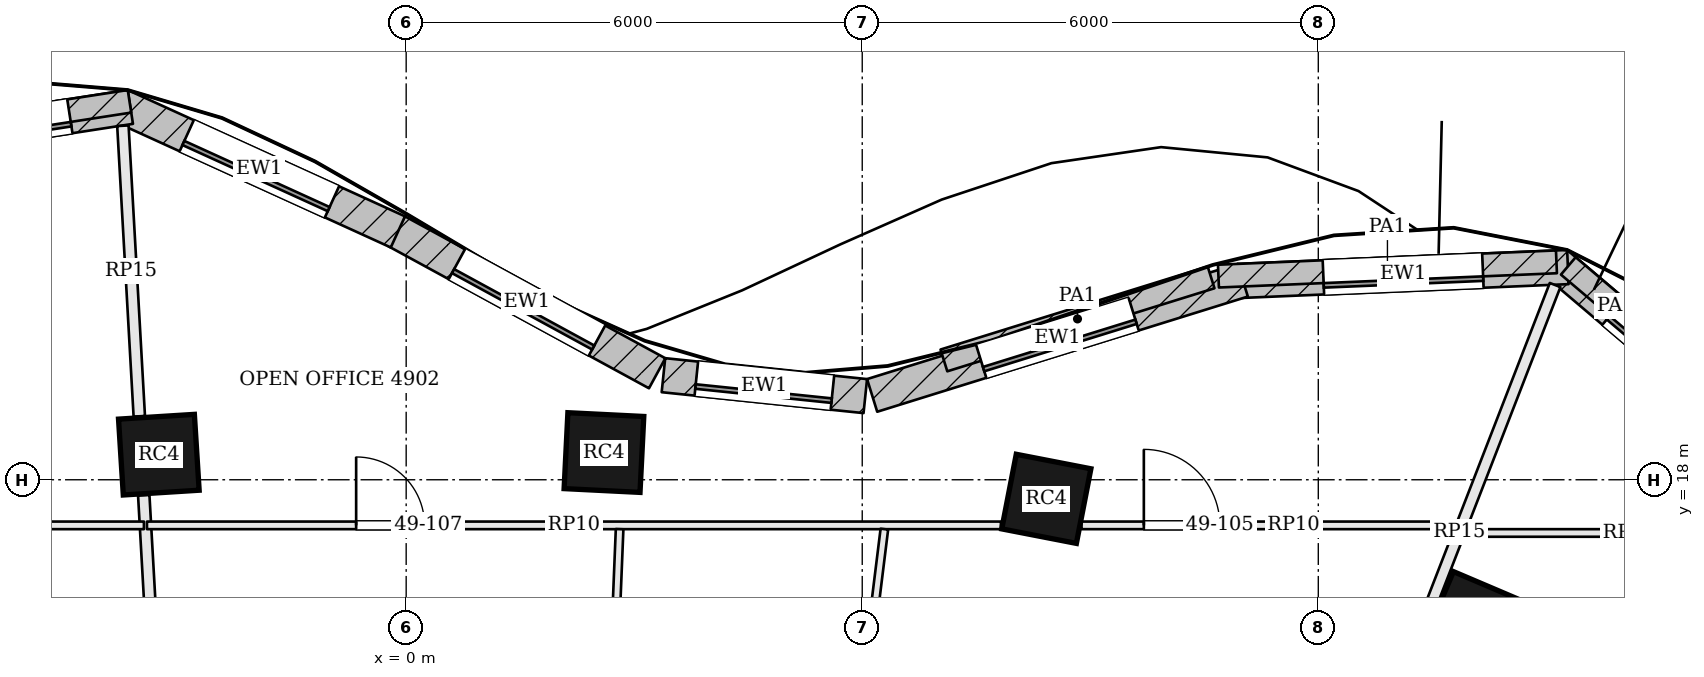
"""IFC4 building model, lengths in metres.
Left out: names, types, materials, properties, quantities, classifications, styles, units other than length and angle.
Written with IfcOpenShell. Run it as: python <this file> out.ifc"""

import sys

from ifc_helpers import new_model, si_unit, direction, frame, frame_2d, origin, origin_2d, place, context, subcontext, project, spatial, rectangle, extrude, element, fill, save


model = new_model("IFC4")
c1 = context("Model", 3, precision=1e-05, world=origin(), true_north=direction((0.0, 1.0)))
c2 = subcontext(c1, "Body", "Model", "MODEL_VIEW")
j1 = project(units=[si_unit("LENGTHUNIT", "METRE"), si_unit("PLANEANGLEUNIT", "RADIAN")], contexts=[c1])
p1 = place(None, origin())
s1 = spatial("IfcSite", under=j1, at=p1, CompositionType="ELEMENT")
p2 = place(p1, origin())
s2 = spatial("IfcBuilding", under=s1, at=p2, CompositionType="ELEMENT")
p3 = place(p2, frame((0.0, 0.0, 201.3)))
s3 = spatial("IfcBuildingStorey", under=s2, at=p3, CompositionType="ELEMENT", Elevation=201.3)
for number, where, z_axis, x_axis in (
    (1, (14.042, 16.136, 0.0), (0.0, 0.0, 1.0), (-0.92, 0.392, 0.0)),
    (2, (8.422, 17.749, 0.0), (0.0, 0.0, 1.0), (-0.982, 0.191, 0.0)),
    (3, (2.602, 18.358, 0.0), (0.0, 0.0, 1.0), (-0.999, 0.05, 0.0)),
    (4, (-3.254, 18.33, 0.0), (0.0, 0.0, 1.0), (-0.998, -0.063, 0.0)),
):
    element("IfcColumn", number, at=place(p3, frame(where, z_axis=z_axis, x_axis=x_axis)), inside=s3, PredefinedType="COLUMN", context=c2, shape_type="SweptSolid", body=[
        extrude(rectangle(XDim=1.0, YDim=1.0, at=origin_2d()), origin(), (0.0, 0.0, 1.0), 3.9),
    ])
p4 = place(p3, frame((18.238, 18.212, 0.0), z_axis=(0.0, 0.0, 1.0), x_axis=(-0.762479604733, 0.647012250554, 0.0)))
e5 = element("IfcWall", 5, at=p4, inside=s3, PredefinedType="SOLIDWALL", context=c2, shape_type="SweptSolid", body=[
    extrude(rectangle(XDim=4.079, YDim=0.45, at=frame_2d((2.039, 0.0))), origin(), (0.0, 0.0, 1.0), 3.7),
])
p5 = place(p4, frame((0.99, 0.0, 0.9)))
e6 = element("IfcOpeningElement", 6, at=p5, cuts=e5, PredefinedType="OPENING", context=c2, shape_type="SweptSolid", body=[
    extrude(rectangle(XDim=2.1, YDim=2.3, at=frame_2d((1.05, 1.15))), frame((0.0, 0.235, 0.0), z_axis=(0.0, -1.0, 0.0), x_axis=(1.0, 0.0, 0.0)), (0.0, 0.0, 1.0), 0.47),
])
p6 = place(p3, frame((15.283, 20.798, 0.0), z_axis=(0.0, 0.0, 1.0), x_axis=(-0.999108814386, -0.042208731526, 0.0)))
e7 = element("IfcWall", 7, at=p6, inside=s3, PredefinedType="SOLIDWALL", context=c2, shape_type="SweptSolid", body=[
    extrude(rectangle(XDim=4.338, YDim=0.45, at=frame_2d((2.169, 0.0))), origin(), (0.0, 0.0, 1.0), 3.7),
])
p7 = place(p6, frame((1.119, 0.0, 0.9)))
e8 = element("IfcOpeningElement", 8, at=p7, cuts=e7, PredefinedType="OPENING", context=c2, shape_type="SweptSolid", body=[
    extrude(rectangle(XDim=2.1, YDim=2.3, at=frame_2d((1.05, 1.15))), frame((0.0, 0.235, 0.0), z_axis=(0.0, -1.0, 0.0), x_axis=(1.0, 0.0, 0.0)), (0.0, 0.0, 1.0), 0.47),
])
p8 = place(p3, frame((11.007, 20.625, 0.0), z_axis=(0.0, 0.0, 1.0), x_axis=(-0.954949254112, -0.296769139352, 0.0)))
e9 = element("IfcWall", 9, at=p8, inside=s3, PredefinedType="SOLIDWALL", context=c2, shape_type="SweptSolid", body=[
    extrude(rectangle(XDim=5.106, YDim=0.45, at=frame_2d((2.553, 0.0))), origin(), (0.0, 0.0, 1.0), 3.7),
])
p9 = place(p8, frame((1.503, 0.0, 0.9)))
e10 = element("IfcOpeningElement", 10, at=p9, cuts=e9, PredefinedType="OPENING", context=c2, shape_type="SweptSolid", body=[
    extrude(rectangle(XDim=2.1, YDim=2.3, at=frame_2d((1.05, 1.15))), frame((0.0, 0.235, 0.0), z_axis=(0.0, -1.0, 0.0), x_axis=(1.0, 0.0, 0.0)), (0.0, 0.0, 1.0), 0.47),
])
p10 = place(p3, frame((6.04, 19.101, 0.0), z_axis=(0.0, 0.0, 1.0), x_axis=(-0.994675968472, 0.103052014752, 0.0)))
e11 = element("IfcWall", 11, at=p10, inside=s3, PredefinedType="SOLIDWALL", context=c2, shape_type="SweptSolid", body=[
    extrude(rectangle(XDim=2.67, YDim=0.45, at=frame_2d((1.335, 0.0))), origin(), (0.0, 0.0, 1.0), 3.7),
])
p11 = place(p10, frame((0.435, 0.0, 0.9)))
e12 = element("IfcOpeningElement", 12, at=p11, cuts=e11, PredefinedType="OPENING", context=c2, shape_type="SweptSolid", body=[
    extrude(rectangle(XDim=1.8, YDim=2.3, at=frame_2d((0.9, 1.15))), frame((0.0, 0.235, 0.0), z_axis=(0.0, -1.0, 0.0), x_axis=(1.0, 0.0, 0.0)), (0.0, 0.0, 1.0), 0.47),
])
p12 = place(p3, frame((3.302, 19.401, 0.0), z_axis=(0.0, 0.0, 1.0), x_axis=(-0.878060540763, 0.47854956562, 0.0)))
e13 = element("IfcWall", 13, at=p12, inside=s3, PredefinedType="SOLIDWALL", context=c2, shape_type="SweptSolid", body=[
    extrude(rectangle(XDim=3.901, YDim=0.45, at=frame_2d((1.951, 0.0))), origin(), (0.0, 0.0, 1.0), 3.7),
])
p13 = place(p12, frame((0.901, 0.0, 0.9)))
e14 = element("IfcOpeningElement", 14, at=p13, cuts=e13, PredefinedType="OPENING", context=c2, shape_type="SweptSolid", body=[
    extrude(rectangle(XDim=2.1, YDim=2.3, at=frame_2d((1.05, 1.15))), frame((0.0, 0.235, 0.0), z_axis=(0.0, -1.0, 0.0), x_axis=(1.0, 0.0, 0.0)), (0.0, 0.0, 1.0), 0.47),
])
p14 = place(p3, frame((-0.109, 21.261, 0.0), z_axis=(0.0, 0.0, 1.0), x_axis=(-0.910040573706, 0.414519184367, 0.0)))
e15 = element("IfcWall", 15, at=p14, inside=s3, PredefinedType="SOLIDWALL", context=c2, shape_type="SweptSolid", body=[
    extrude(rectangle(XDim=4.006, YDim=0.45, at=frame_2d((2.003, 0.0))), origin(), (0.0, 0.0, 1.0), 3.7),
])
p15 = place(p14, frame((0.953, 0.0, 0.9)))
e16 = element("IfcOpeningElement", 16, at=p15, cuts=e15, PredefinedType="OPENING", context=c2, shape_type="SweptSolid", body=[
    extrude(rectangle(XDim=2.1, YDim=2.3, at=frame_2d((1.05, 1.15))), frame((0.0, 0.235, 0.0), z_axis=(0.0, -1.0, 0.0), x_axis=(1.0, 0.0, 0.0)), (0.0, 0.0, 1.0), 0.47),
])
p16 = place(p3, frame((-3.629, 22.905, 0.0), z_axis=(0.0, 0.0, 1.0), x_axis=(-0.988300084321, -0.152521943772, 0.0)))
e17 = element("IfcWall", 17, at=p16, inside=s3, PredefinedType="SOLIDWALL", context=c2, shape_type="SweptSolid", body=[
    extrude(rectangle(XDim=3.71, YDim=0.45, at=frame_2d((1.855, 0.0))), origin(), (0.0, 0.0, 1.0), 3.7),
])
p17 = place(p16, frame((0.805, 0.0, 0.9)))
e18 = element("IfcOpeningElement", 18, at=p17, cuts=e17, PredefinedType="OPENING", context=c2, shape_type="SweptSolid", body=[
    extrude(rectangle(XDim=2.1, YDim=2.3, at=frame_2d((1.05, 1.15))), frame((0.0, 0.235, 0.0), z_axis=(0.0, -1.0, 0.0), x_axis=(1.0, 0.0, 0.0)), (0.0, 0.0, 1.0), 0.47),
])
p18 = place(p3, frame((16.542, 19.75, 3.9), z_axis=(0.0, 0.0, 1.0), x_axis=(-0.762426907318, 0.647074347349, 0.0)))
e19 = element("IfcWall", 19, at=p18, inside=s3, PredefinedType="PARAPET", context=c2, shape_type="SweptSolid", body=[
    extrude(rectangle(XDim=1.642, YDim=0.3, at=frame_2d((0.821, 0.0))), origin(), (0.0, 0.0, 1.0), 1.1),
])
p19 = place(p3, frame((15.133, 20.867, 3.9), z_axis=(0.0, 0.0, 1.0), x_axis=(-0.999109914186, -0.042182690458, 0.0)))
e20 = element("IfcWall", 20, at=p19, inside=s3, PredefinedType="PARAPET", context=c2, shape_type="SweptSolid", body=[
    extrude(rectangle(XDim=4.451, YDim=0.3, at=frame_2d((2.225, 0.0))), origin(), (0.0, 0.0, 1.0), 1.1),
])
p20 = place(p3, frame((10.59, 20.662, 3.9), z_axis=(0.0, 0.0, 1.0), x_axis=(-0.954933257017, -0.296820610207, 0.0)))
e21 = element("IfcWall", 21, at=p20, inside=s3, PredefinedType="PARAPET", context=c2, shape_type="SweptSolid", body=[
    extrude(rectangle(XDim=3.681, YDim=0.3, at=frame_2d((1.84, 0.0))), origin(), (0.0, 0.0, 1.0), 1.1),
])
p21 = place(p3, frame((-3.64, 22.979, 3.9), z_axis=(0.0, 0.0, 1.0), x_axis=(-0.988299486994, -0.152525814235, 0.0)))
e22 = element("IfcWall", 22, at=p21, inside=s3, PredefinedType="PARAPET", context=c2, shape_type="SweptSolid", body=[
    extrude(rectangle(XDim=3.602, YDim=0.3, at=frame_2d((1.801, 0.0))), origin(), (0.0, 0.0, 1.0), 1.1),
])
p22 = place(p3, frame((15.115, 20.562, 0.0), z_axis=(0.0, 0.0, 1.0), x_axis=(-0.361705111114, -0.932292557406, 0.0)))
e23 = element("IfcWall", 23, at=p22, inside=s3, PredefinedType="PARTITIONING", context=c2, shape_type="SweptSolid", body=[
    extrude(rectangle(XDim=6.964, YDim=0.15, at=frame_2d((3.482, 0.0))), origin(), (0.0, 0.0, 1.0), 3.084),
])
p23 = place(p3, frame((-3.727, 22.657, 0.0), z_axis=(0.0, 0.0, 1.0), x_axis=(0.056374181452, -0.998409711324, 0.0)))
e24 = element("IfcWall", 24, at=p23, inside=s3, PredefinedType="PARTITIONING", context=c2, shape_type="SweptSolid", body=[
    extrude(rectangle(XDim=3.828, YDim=0.15, at=frame_2d((1.914, 0.0))), origin(), (0.0, 0.0, 1.0), 3.084),
])
p24 = place(p3, frame((-3.452, 17.796, 0.0), z_axis=(0.0, 0.0, 1.0), x_axis=(0.056329758448, -0.998412218632, 0.0)))
e25 = element("IfcWall", 25, at=p24, inside=s3, PredefinedType="PARTITIONING", context=c2, shape_type="SweptSolid", body=[
    extrude(rectangle(XDim=3.727, YDim=0.15, at=frame_2d((1.864, 0.0))), origin(), (0.0, 0.0, 1.0), 3.084),
])
p25 = place(p3, frame((13.871, 17.3, 0.0), z_axis=(0.0, 0.0, 1.0), x_axis=(1.0, 0.0, 0.0)))
e26 = element("IfcWall", 26, at=p25, inside=s3, PredefinedType="PARTITIONING", context=c2, shape_type="SweptSolid", body=[
    extrude(rectangle(XDim=4.428, YDim=0.1, at=frame_2d((2.214, 0.0))), origin(), (0.0, 0.0, 1.0), 3.084),
])
p26 = place(p3, frame((15.036, 12.697, 0.0), z_axis=(0.0, 0.0, 1.0), x_axis=(0.482822947205, 0.87571799208, 0.0)))
e27 = element("IfcWall", 27, at=p26, inside=s3, PredefinedType="PARTITIONING", context=c2, shape_type="SweptSolid", body=[
    extrude(rectangle(XDim=6.166, YDim=0.1, at=frame_2d((3.083, 0.0))), origin(), (0.0, 0.0, 1.0), 3.084),
])
p27 = place(p3, frame((-3.41, 17.4, 0.0), z_axis=(0.0, 0.0, 1.0), x_axis=(1.0, 0.0, 0.0)))
e28 = element("IfcWall", 28, at=p27, inside=s3, PredefinedType="PARTITIONING", context=c2, shape_type="SweptSolid", body=[
    extrude(rectangle(XDim=11.235, YDim=0.1, at=frame_2d((5.617, 0.0))), origin(), (0.0, 0.0, 1.0), 3.084),
])
p28 = place(p27, frame((2.752, 0.0, 0.0)))
e29 = element("IfcOpeningElement", 29, at=p28, cuts=e28, PredefinedType="OPENING", context=c2, shape_type="SweptSolid", body=[
    extrude(rectangle(XDim=0.9, YDim=2.1, at=frame_2d((0.45, 1.05))), frame((0.0, 0.06, 0.0), z_axis=(0.0, -1.0, 0.0), x_axis=(1.0, 0.0, 0.0)), (0.0, 0.0, 1.0), 0.12),
])
p29 = place(p3, frame((8.884, 17.4, 0.0), z_axis=(0.0, 0.0, 1.0), x_axis=(1.0, 0.0, 0.0)))
e30 = element("IfcWall", 30, at=p29, inside=s3, PredefinedType="PARTITIONING", context=c2, shape_type="SweptSolid", body=[
    extrude(rectangle(XDim=4.983, YDim=0.1, at=frame_2d((2.492, 0.0))), origin(), (0.0, 0.0, 1.0), 3.084),
])
p30 = place(p29, frame((0.821, 0.0, 0.0)))
e31 = element("IfcOpeningElement", 31, at=p30, cuts=e30, PredefinedType="OPENING", context=c2, shape_type="SweptSolid", body=[
    extrude(rectangle(XDim=1.0, YDim=2.1, at=frame_2d((0.5, 1.05))), frame((0.0, 0.06, 0.0), z_axis=(0.0, -1.0, 0.0), x_axis=(1.0, 0.0, 0.0)), (0.0, 0.0, 1.0), 0.12),
])
p31 = place(p3, frame((5.886, 14.074, 0.0), z_axis=(0.0, 0.0, 1.0), x_axis=(0.122778403884, 0.992434110427, 0.0)))
e32 = element("IfcWall", 32, at=p31, inside=s3, PredefinedType="PARTITIONING", context=c2, shape_type="SweptSolid", body=[
    extrude(rectangle(XDim=3.301, YDim=0.1, at=frame_2d((1.65, 0.0))), origin(), (0.0, 0.0, 1.0), 3.084),
])
p32 = place(p3, frame((2.675, 14.075, 0.0), z_axis=(0.0, 0.0, 1.0), x_axis=(0.040667038657, 0.999172753815, 0.0)))
e33 = element("IfcWall", 33, at=p32, inside=s3, PredefinedType="PARTITIONING", context=c2, shape_type="SweptSolid", body=[
    extrude(rectangle(XDim=3.278, YDim=0.1, at=frame_2d((1.639, 0.0))), origin(), (0.0, 0.0, 1.0), 3.084),
])
p33 = place(p3, frame((-8.483, 17.4, 0.0), z_axis=(0.0, 0.0, 1.0), x_axis=(1.0, 0.0, 0.0)))
e34 = element("IfcWall", 34, at=p33, inside=s3, PredefinedType="PARTITIONING", context=c2, shape_type="SweptSolid", body=[
    extrude(rectangle(XDim=5.032, YDim=0.1, at=frame_2d((2.516, 0.0))), origin(), (0.0, 0.0, 1.0), 3.084),
])
p34 = place(p33, frame((1.458, 0.0, 0.0)))
e35 = element("IfcOpeningElement", 35, at=p34, cuts=e34, PredefinedType="OPENING", context=c2, shape_type="SweptSolid", body=[
    extrude(rectangle(XDim=1.0, YDim=2.1, at=frame_2d((0.5, 1.05))), frame((0.0, 0.06, 0.0), z_axis=(0.0, -1.0, 0.0), x_axis=(1.0, 0.0, 0.0)), (0.0, 0.0, 1.0), 0.12),
])
p35 = place(p5, origin())
e36 = element("IfcWindow", 36, at=p35, inside=s3, PartitioningType="SINGLE_PANEL", PredefinedType="WINDOW", context=c2, shape_type="SweptSolid", body=[
    extrude(rectangle(XDim=2.1, YDim=2.3, at=frame_2d((1.05, 1.15))), frame((0.0, 0.135, 0.0), z_axis=(0.0, -1.0, 0.0), x_axis=(1.0, 0.0, 0.0)), (0.0, 0.0, 1.0), 0.06),
])
fill(e6, e36)
p36 = place(p7, origin())
e37 = element("IfcWindow", 37, at=p36, inside=s3, PartitioningType="SINGLE_PANEL", PredefinedType="WINDOW", context=c2, shape_type="SweptSolid", body=[
    extrude(rectangle(XDim=2.1, YDim=2.3, at=frame_2d((1.05, 1.15))), frame((0.0, 0.135, 0.0), z_axis=(0.0, -1.0, 0.0), x_axis=(1.0, 0.0, 0.0)), (0.0, 0.0, 1.0), 0.06),
])
fill(e8, e37)
p37 = place(p9, origin())
e38 = element("IfcWindow", 38, at=p37, inside=s3, PartitioningType="SINGLE_PANEL", PredefinedType="WINDOW", context=c2, shape_type="SweptSolid", body=[
    extrude(rectangle(XDim=2.1, YDim=2.3, at=frame_2d((1.05, 1.15))), frame((0.0, 0.135, 0.0), z_axis=(0.0, -1.0, 0.0), x_axis=(1.0, 0.0, 0.0)), (0.0, 0.0, 1.0), 0.06),
])
fill(e10, e38)
p38 = place(p11, origin())
e39 = element("IfcWindow", 39, at=p38, inside=s3, PartitioningType="SINGLE_PANEL", PredefinedType="WINDOW", context=c2, shape_type="SweptSolid", body=[
    extrude(rectangle(XDim=1.8, YDim=2.3, at=frame_2d((0.9, 1.15))), frame((0.0, 0.135, 0.0), z_axis=(0.0, -1.0, 0.0), x_axis=(1.0, 0.0, 0.0)), (0.0, 0.0, 1.0), 0.06),
])
fill(e12, e39)
p39 = place(p13, origin())
e40 = element("IfcWindow", 40, at=p39, inside=s3, PartitioningType="SINGLE_PANEL", PredefinedType="WINDOW", context=c2, shape_type="SweptSolid", body=[
    extrude(rectangle(XDim=2.1, YDim=2.3, at=frame_2d((1.05, 1.15))), frame((0.0, 0.135, 0.0), z_axis=(0.0, -1.0, 0.0), x_axis=(1.0, 0.0, 0.0)), (0.0, 0.0, 1.0), 0.06),
])
fill(e14, e40)
p40 = place(p15, origin())
e41 = element("IfcWindow", 41, at=p40, inside=s3, PartitioningType="SINGLE_PANEL", PredefinedType="WINDOW", context=c2, shape_type="SweptSolid", body=[
    extrude(rectangle(XDim=2.1, YDim=2.3, at=frame_2d((1.05, 1.15))), frame((0.0, 0.135, 0.0), z_axis=(0.0, -1.0, 0.0), x_axis=(1.0, 0.0, 0.0)), (0.0, 0.0, 1.0), 0.06),
])
fill(e16, e41)
p41 = place(p17, origin())
e42 = element("IfcWindow", 42, at=p41, inside=s3, PartitioningType="SINGLE_PANEL", PredefinedType="WINDOW", context=c2, shape_type="SweptSolid", body=[
    extrude(rectangle(XDim=2.1, YDim=2.3, at=frame_2d((1.05, 1.15))), frame((0.0, 0.135, 0.0), z_axis=(0.0, -1.0, 0.0), x_axis=(1.0, 0.0, 0.0)), (0.0, 0.0, 1.0), 0.06),
])
fill(e18, e42)
p42 = place(p30, origin())
e43 = element("IfcDoor", 43, at=p42, inside=s3, OperationType="SINGLE_SWING_LEFT", PredefinedType="DOOR", context=c2, shape_type="SweptSolid", body=[
    extrude(rectangle(XDim=1.0, YDim=2.1, at=frame_2d((0.5, 1.05))), frame((0.0, 0.025, 0.0), z_axis=(0.0, -1.0, 0.0), x_axis=(1.0, 0.0, 0.0)), (0.0, 0.0, 1.0), 0.05),
])
fill(e31, e43)
p43 = place(p28, origin())
e44 = element("IfcDoor", 44, at=p43, inside=s3, OperationType="SINGLE_SWING_LEFT", PredefinedType="DOOR", context=c2, shape_type="SweptSolid", body=[
    extrude(rectangle(XDim=0.9, YDim=2.1, at=frame_2d((0.45, 1.05))), frame((0.0, 0.025, 0.0), z_axis=(0.0, -1.0, 0.0), x_axis=(1.0, 0.0, 0.0)), (0.0, 0.0, 1.0), 0.05),
])
fill(e29, e44)
save(model, sys.argv[1])
